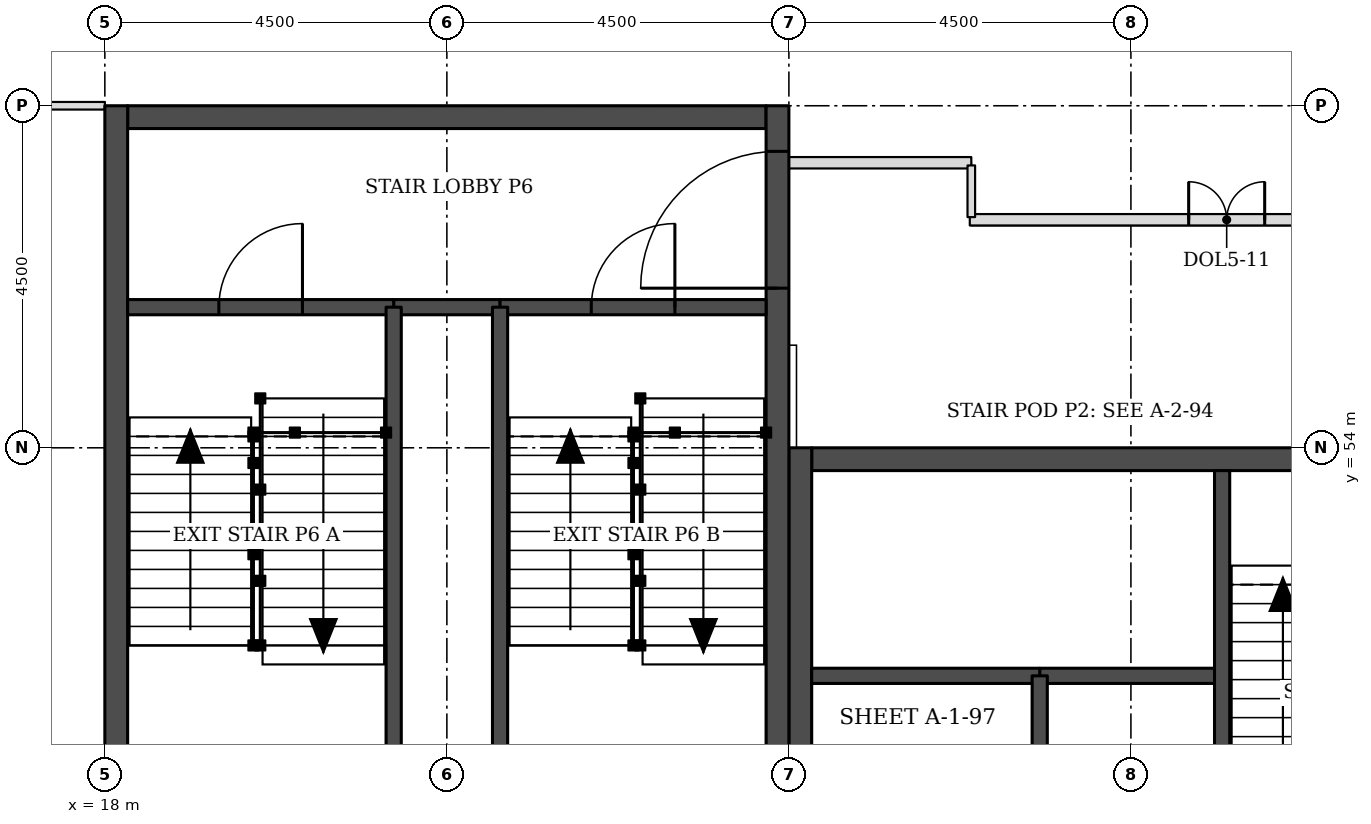
"""IFC4 building model, lengths in metres.
Left out: names, types, materials, properties, quantities, classifications, styles, units other than length and angle.
Written with IfcOpenShell. Run it as: python <this file> out.ifc"""

import sys

from ifc_helpers import new_model, si_unit, direction, frame, frame_2d, origin, place, context, subcontext, project, spatial, rectangle, extrude, element, fill, save


model = new_model("IFC4")
c1 = context("Model", 3, precision=1e-05, world=origin(), true_north=direction((0.0, 1.0)))
c2 = subcontext(c1, "Body", "Model", "MODEL_VIEW")
j1 = project(units=[si_unit("LENGTHUNIT", "METRE"), si_unit("PLANEANGLEUNIT", "RADIAN")], contexts=[c1])
p1 = place(None, origin())
s1 = spatial("IfcSite", under=j1, at=p1, CompositionType="ELEMENT")
p2 = place(p1, origin())
s2 = spatial("IfcBuilding", under=s1, at=p2, CompositionType="ELEMENT")
p3 = place(p2, frame((0.0, 0.0, 108.5)))
s3 = spatial("IfcBuildingStorey", under=s2, at=p3, CompositionType="ELEMENT", Elevation=108.5)
p4 = place(p3, frame((27.3, 53.85, 0.0), z_axis=(0.0, 0.0, 1.0), x_axis=(1.0, 0.0, 0.0)))
e1 = element("IfcWall", 1, at=p4, inside=s3, PredefinedType="SHEAR", context=c2, shape_type="SweptSolid", body=[
    extrude(rectangle(XDim=8.4, YDim=0.3, at=frame_2d((4.2, 0.0))), origin(), (0.0, 0.0, 1.0), 3.7),
])
p5 = place(p4, frame((6.4, 0.0, 0.0)))
e2 = element("IfcOpeningElement", 2, at=p5, cuts=e1, PredefinedType="OPENING", context=c2, shape_type="SweptSolid", body=[
    extrude(rectangle(XDim=1.1, YDim=2.1, at=frame_2d((0.55, 1.05))), frame((0.0, 0.16, 0.0), z_axis=(0.0, -1.0, 0.0), x_axis=(1.0, 0.0, 0.0)), (0.0, 0.0, 1.0), 0.32),
])
p6 = place(p3, frame((27.15, 45.0, 0.0), z_axis=(0.0, 0.0, 1.0), x_axis=(0.0, 1.0, 0.0)))
e3 = element("IfcWall", 3, at=p6, inside=s3, PredefinedType="SHEAR", context=c2, shape_type="SweptSolid", body=[
    extrude(rectangle(XDim=9.0, YDim=0.3, at=frame_2d((4.5, 0.0))), origin(), (0.0, 0.0, 1.0), 3.7),
])
p7 = place(p6, frame((0.4, 0.0, 0.0)))
e4 = element("IfcOpeningElement", 4, at=p7, cuts=e3, PredefinedType="OPENING", context=c2, shape_type="SweptSolid", body=[
    extrude(rectangle(XDim=1.1, YDim=2.1, at=frame_2d((0.55, 1.05))), frame((0.0, 0.16, 0.0), z_axis=(0.0, -1.0, 0.0), x_axis=(1.0, 0.0, 0.0)), (0.0, 0.0, 1.0), 0.32),
])
p8 = place(p3, frame((18.3, 58.35, 0.0), z_axis=(0.0, 0.0, 1.0), x_axis=(1.0, 0.0, 0.0)))
e5 = element("IfcWall", 5, at=p8, inside=s3, PredefinedType="SHEAR", context=c2, shape_type="SweptSolid", body=[
    extrude(rectangle(XDim=8.4, YDim=0.3, at=frame_2d((4.2, 0.0))), origin(), (0.0, 0.0, 1.0), 3.7),
])
p9 = place(p3, frame((18.15, 49.5, 0.0), z_axis=(0.0, 0.0, 1.0), x_axis=(0.0, 1.0, 0.0)))
e6 = element("IfcWall", 6, at=p9, inside=s3, PredefinedType="SHEAR", context=c2, shape_type="SweptSolid", body=[
    extrude(rectangle(XDim=9.0, YDim=0.3, at=frame_2d((4.5, 0.0))), origin(), (0.0, 0.0, 1.0), 3.7),
])
p10 = place(p3, frame((26.85, 49.5, 0.0), z_axis=(0.0, 0.0, 1.0), x_axis=(0.0, 1.0, 0.0)))
e7 = element("IfcWall", 7, at=p10, inside=s3, PredefinedType="SHEAR", context=c2, shape_type="SweptSolid", body=[
    extrude(rectangle(XDim=9.0, YDim=0.3, at=frame_2d((4.5, 0.0))), origin(), (0.0, 0.0, 1.0), 3.7),
])
p11 = place(p10, frame((6.6, 0.0, 0.0)))
e8 = element("IfcOpeningElement", 8, at=p11, cuts=e7, PredefinedType="OPENING", context=c2, shape_type="SweptSolid", body=[
    extrude(rectangle(XDim=1.8, YDim=2.1, at=frame_2d((0.9, 1.05))), frame((0.0, 0.16, 0.0), z_axis=(0.0, -1.0, 0.0), x_axis=(1.0, 0.0, 0.0)), (0.0, 0.0, 1.0), 0.32),
])
p12 = place(p3, frame((17.761, 63.751, 0.0), z_axis=(0.0, 0.0, 1.0), x_axis=(-0.707106781187, -0.707106781187, 0.0)))
e9 = element("IfcWall", 9, at=p12, inside=s3, PredefinedType="STANDARD", context=c2, shape_type="SweptSolid", body=[
    extrude(rectangle(XDim=7.089, YDim=0.35, at=frame_2d((3.544, 0.0))), origin(), (0.0, 0.0, 1.0), 3.525),
])
p13 = place(p12, frame((1.894, 0.0, 0.9)))
e10 = element("IfcOpeningElement", 10, at=p13, cuts=e9, PredefinedType="OPENING", context=c2, shape_type="SweptSolid", body=[
    extrude(rectangle(XDim=3.3, YDim=1.9, at=frame_2d((1.65, 0.95))), frame((0.0, 0.185, 0.0), z_axis=(0.0, -1.0, 0.0), x_axis=(1.0, 0.0, 0.0)), (0.0, 0.0, 1.0), 0.37),
])
p14 = place(p3, frame((29.38, 57.0, 0.0), z_axis=(0.0, 0.0, 1.0), x_axis=(1.0, 0.0, 0.0)))
e11 = element("IfcWall", 11, at=p14, inside=s3, PredefinedType="PARTITIONING", context=c2, shape_type="SweptSolid", body=[
    extrude(rectangle(XDim=6.62, YDim=0.15, at=frame_2d((3.31, 0.0))), origin(), (0.0, 0.0, 1.0), 3.55),
])
p15 = place(p14, frame((2.88, 0.0, 0.0)))
e12 = element("IfcOpeningElement", 12, at=p15, cuts=e11, PredefinedType="OPENING", context=c2, shape_type="SweptSolid", body=[
    extrude(rectangle(XDim=1.0, YDim=2.1, at=frame_2d((0.5, 1.05))), frame((0.0, 0.085, 0.0), z_axis=(0.0, -1.0, 0.0), x_axis=(1.0, 0.0, 0.0)), (0.0, 0.0, 1.0), 0.17),
])
p16 = place(p3, frame((13.5, 58.5, 0.0), z_axis=(0.0, 0.0, 1.0), x_axis=(1.0, 0.0, 0.0)))
e13 = element("IfcWall", 13, at=p16, inside=s3, PredefinedType="PARTITIONING", context=c2, shape_type="SweptSolid", body=[
    extrude(rectangle(XDim=4.5, YDim=0.1, at=frame_2d((2.25, 0.0))), origin(), (0.0, 0.0, 1.0), 2.55),
])
p17 = place(p16, frame((1.8, 0.0, 0.0)))
e14 = element("IfcOpeningElement", 14, at=p17, cuts=e13, PredefinedType="OPENING", context=c2, shape_type="SweptSolid", body=[
    extrude(rectangle(XDim=0.9, YDim=2.1, at=frame_2d((0.45, 1.05))), frame((0.0, 0.06, 0.0), z_axis=(0.0, -1.0, 0.0), x_axis=(1.0, 0.0, 0.0)), (0.0, 0.0, 1.0), 0.12),
])
p18 = place(p3, frame((27.0, 57.75, 0.0), z_axis=(0.0, 0.0, 1.0), x_axis=(1.0, 0.0, 0.0)))
e15 = element("IfcWall", 15, at=p18, inside=s3, PredefinedType="PARTITIONING", context=c2, shape_type="SweptSolid", body=[
    extrude(rectangle(XDim=2.4, YDim=0.15, at=frame_2d((1.2, 0.0))), origin(), (0.0, 0.0, 1.0), 3.55),
])
p19 = place(p3, frame((29.4, 57.715, 0.0), z_axis=(0.0, 0.0, 1.0), x_axis=(0.0, -1.0, 0.0)))
e16 = element("IfcWall", 16, at=p19, inside=s3, PredefinedType="PARTITIONING", context=c2, shape_type="SweptSolid", body=[
    extrude(rectangle(XDim=0.68, YDim=0.1, at=frame_2d((0.34, 0.0))), origin(), (0.0, 0.0, 1.0), 3.55),
])
p20 = place(p3, frame((30.3, 51.0, 0.0), z_axis=(0.0, 0.0, 1.0), x_axis=(1.0, 0.0, 0.0)))
e17 = element("IfcWall", 17, at=p20, inside=s3, PredefinedType="SOLIDWALL", context=c2, shape_type="SweptSolid", body=[
    extrude(rectangle(XDim=2.4, YDim=0.2, at=frame_2d((1.2, 0.0))), origin(), (0.0, 0.0, 1.0), 3.7),
])
p21 = place(p3, frame((27.3, 51.0, 0.0), z_axis=(0.0, 0.0, 1.0), x_axis=(1.0, 0.0, 0.0)))
e18 = element("IfcWall", 18, at=p21, inside=s3, PredefinedType="SOLIDWALL", context=c2, shape_type="SweptSolid", body=[
    extrude(rectangle(XDim=3.0, YDim=0.2, at=frame_2d((1.5, 0.0))), origin(), (0.0, 0.0, 1.0), 3.55),
])
for number, where, z_axis, x_axis in (
    (19, (30.3, 45.3, 0.0), (0.0, 0.0, 1.0), (0.0, 1.0, 0.0)),
    (20, (32.7, 48.0, 0.0), (0.0, 0.0, 1.0), (0.0, 1.0, 0.0)),
):
    element("IfcWall", number, at=place(p3, frame(where, z_axis=z_axis, x_axis=x_axis)), inside=s3, PredefinedType="SOLIDWALL", context=c2, shape_type="SweptSolid", body=[
        extrude(rectangle(XDim=5.7, YDim=0.2, at=frame_2d((2.85, 0.0))), origin(), (0.0, 0.0, 1.0), 3.55),
    ])
p22 = place(p3, frame((21.8, 55.85, 0.0), z_axis=(0.0, 0.0, 1.0), x_axis=(1.0, 0.0, 0.0)))
e21 = element("IfcWall", 21, at=p22, inside=s3, PredefinedType="SOLIDWALL", context=c2, shape_type="SweptSolid", body=[
    extrude(rectangle(XDim=1.4, YDim=0.2, at=frame_2d((0.7, 0.0))), origin(), (0.0, 0.0, 1.0), 3.55),
])
p23 = place(p3, frame((18.3, 55.85, 0.0), z_axis=(0.0, 0.0, 1.0), x_axis=(1.0, 0.0, 0.0)))
e22 = element("IfcWall", 22, at=p23, inside=s3, PredefinedType="SOLIDWALL", context=c2, shape_type="SweptSolid", body=[
    extrude(rectangle(XDim=3.5, YDim=0.2, at=frame_2d((1.75, 0.0))), origin(), (0.0, 0.0, 1.0), 3.55),
])
p24 = place(p23, frame((1.2, 0.0, 0.0)))
e23 = element("IfcOpeningElement", 23, at=p24, cuts=e22, PredefinedType="OPENING", context=c2, shape_type="SweptSolid", body=[
    extrude(rectangle(XDim=1.1, YDim=2.1, at=frame_2d((0.55, 1.05))), frame((0.0, 0.11, 0.0), z_axis=(0.0, -1.0, 0.0), x_axis=(1.0, 0.0, 0.0)), (0.0, 0.0, 1.0), 0.22),
])
p25 = place(p3, frame((23.2, 55.85, 0.0), z_axis=(0.0, 0.0, 1.0), x_axis=(1.0, 0.0, 0.0)))
e24 = element("IfcWall", 24, at=p25, inside=s3, PredefinedType="SOLIDWALL", context=c2, shape_type="SweptSolid", body=[
    extrude(rectangle(XDim=3.5, YDim=0.2, at=frame_2d((1.75, 0.0))), origin(), (0.0, 0.0, 1.0), 3.55),
])
p26 = place(p25, frame((1.2, 0.0, 0.0)))
e25 = element("IfcOpeningElement", 25, at=p26, cuts=e24, PredefinedType="OPENING", context=c2, shape_type="SweptSolid", body=[
    extrude(rectangle(XDim=1.1, YDim=2.1, at=frame_2d((0.55, 1.05))), frame((0.0, 0.11, 0.0), z_axis=(0.0, -1.0, 0.0), x_axis=(1.0, 0.0, 0.0)), (0.0, 0.0, 1.0), 0.22),
])
for number, where, z_axis, x_axis in (
    (26, (21.8, 49.8, 0.0), (0.0, 0.0, 1.0), (0.0, 1.0, 0.0)),
    (27, (23.2, 49.8, 0.0), (0.0, 0.0, 1.0), (0.0, 1.0, 0.0)),
):
    element("IfcWall", number, at=place(p3, frame(where, z_axis=z_axis, x_axis=x_axis)), inside=s3, PredefinedType="SOLIDWALL", context=c2, shape_type="SweptSolid", body=[
        extrude(rectangle(XDim=6.05, YDim=0.2, at=frame_2d((3.025, 0.0))), origin(), (0.0, 0.0, 1.0), 3.55),
    ])
p27 = place(p15, origin())
e28 = element("IfcDoor", 28, at=p27, inside=s3, OperationType="DOUBLE_DOOR_SINGLE_SWING", PredefinedType="DOOR", context=c2, shape_type="SweptSolid", body=[
    extrude(rectangle(XDim=1.0, YDim=2.1, at=frame_2d((0.5, 1.05))), frame((0.0, 0.025, 0.0), z_axis=(0.0, -1.0, 0.0), x_axis=(1.0, 0.0, 0.0)), (0.0, 0.0, 1.0), 0.05),
])
fill(e12, e28)
p28 = place(p24, origin())
e29 = element("IfcDoor", 29, at=p28, inside=s3, OperationType="SINGLE_SWING_RIGHT", PredefinedType="DOOR", context=c2, shape_type="SweptSolid", body=[
    extrude(rectangle(XDim=1.1, YDim=2.1, at=frame_2d((0.55, 1.05))), frame((0.0, 0.025, 0.0), z_axis=(0.0, -1.0, 0.0), x_axis=(1.0, 0.0, 0.0)), (0.0, 0.0, 1.0), 0.05),
])
fill(e23, e29)
p29 = place(p26, origin())
e30 = element("IfcDoor", 30, at=p29, inside=s3, OperationType="SINGLE_SWING_RIGHT", PredefinedType="DOOR", context=c2, shape_type="SweptSolid", body=[
    extrude(rectangle(XDim=1.1, YDim=2.1, at=frame_2d((0.55, 1.05))), frame((0.0, 0.025, 0.0), z_axis=(0.0, -1.0, 0.0), x_axis=(1.0, 0.0, 0.0)), (0.0, 0.0, 1.0), 0.05),
])
fill(e25, e30)
p30 = place(p11, origin())
e31 = element("IfcDoor", 31, at=p30, inside=s3, OperationType="SINGLE_SWING_LEFT", PredefinedType="DOOR", context=c2, shape_type="SweptSolid", body=[
    extrude(rectangle(XDim=1.8, YDim=2.1, at=frame_2d((0.9, 1.05))), frame((0.0, 0.025, 0.0), z_axis=(0.0, -1.0, 0.0), x_axis=(1.0, 0.0, 0.0)), (0.0, 0.0, 1.0), 0.05),
])
fill(e8, e31)
save(model, sys.argv[1])
